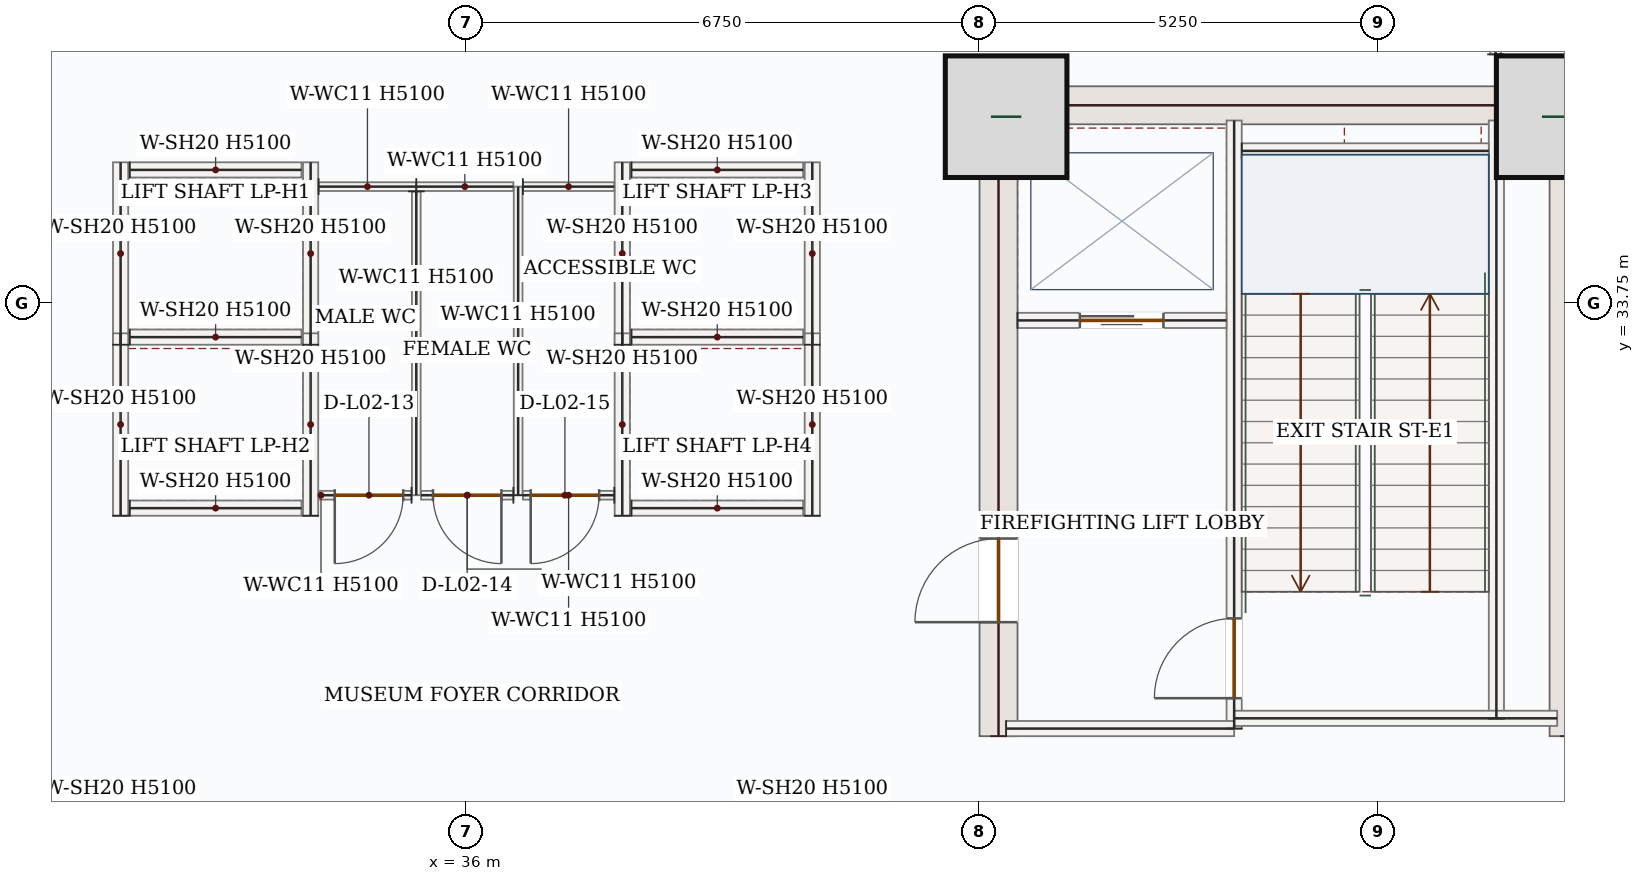
"""IFC4 building model, lengths in metres.
Left out: names, types, materials, properties, quantities, classifications, styles, units other than length and angle.
Written with IfcOpenShell. Run it as: python <this file> out.ifc"""

import sys

from ifc_helpers import new_model, si_unit, direction, frame, frame_2d, origin, origin_2d, place, context, subcontext, project, spatial, rectangle, extrude, source, transform, mapped, element, fill, save


model = new_model("IFC4")
c1 = context("Model", 3, precision=1e-05, world=origin(), true_north=direction((0.0, 1.0)))
c2 = subcontext(c1, "Body", "Model", "MODEL_VIEW")
j1 = project(units=[si_unit("LENGTHUNIT", "METRE"), si_unit("PLANEANGLEUNIT", "RADIAN")], contexts=[c1])
p1 = place(None, origin())
s1 = spatial("IfcSite", under=j1, at=p1, CompositionType="ELEMENT")
p2 = place(p1, origin())
s2 = spatial("IfcBuilding", under=s1, at=p2, CompositionType="ELEMENT")
p3 = place(p2, frame((0.0, 0.0, 12.6)))
s3 = spatial("IfcBuildingStorey", under=s2, at=p3, CompositionType="ELEMENT", Elevation=12.6)
p4 = place(p3, frame((43.0, 28.05, 0.0), z_axis=(0.0, 0.0, 1.0), x_axis=(0.0, 1.0, 0.0)))
e1 = element("IfcWall", 1, at=p4, inside=s3, PredefinedType="SHEAR", context=c2, shape_type="SweptSolid", body=[
    extrude(rectangle(XDim=8.55, YDim=0.5, at=frame_2d((4.275, 0.0))), origin(), (0.0, 0.0, 1.0), 5.1),
])
p5 = place(p4, frame((1.5, 0.0, 0.0)))
e2 = element("IfcOpeningElement", 2, at=p5, cuts=e1, PredefinedType="OPENING", context=c2, shape_type="SweptSolid", body=[
    extrude(rectangle(XDim=1.1, YDim=2.2, at=frame_2d((0.55, 1.1))), frame((0.0, 0.26, 0.0), z_axis=(0.0, -1.0, 0.0), x_axis=(1.0, 0.0, 0.0)), (0.0, 0.0, 1.0), 0.52),
])
m1 = source(origin(), c2, "Body", "SweptSolid", [
    extrude(rectangle(XDim=8.55, YDim=0.5, at=frame_2d((4.275, 0.0))), origin(), (0.0, 0.0, 1.0), 5.1),
])
p6 = place(p3, frame((50.5, 28.05, 0.0), z_axis=(0.0, 0.0, 1.0), x_axis=(0.0, 1.0, 0.0)))
e3 = element("IfcWall", 3, at=p6, inside=s3, PredefinedType="SHEAR", context=c2, shape_type="MappedRepresentation", body=[
    mapped(m1, transform((0.0, 0.0, 0.0), x_axis=(1.0, 0.0, 0.0), y_axis=(0.0, 1.0, 0.0), z_axis=(0.0, 0.0, 1.0), scale=1.0)),
])
m2 = source(origin(), c2, "Body", "SweptSolid", [
    extrude(rectangle(XDim=7.0, YDim=0.5, at=frame_2d((3.5, 0.0))), origin(), (0.0, 0.0, 1.0), 5.1),
])
p7 = place(p3, frame((43.25, 36.35, 0.0), z_axis=(0.0, 0.0, 1.0), x_axis=(1.0, 0.0, 0.0)))
e4 = element("IfcWall", 4, at=p7, inside=s3, PredefinedType="SHEAR", context=c2, shape_type="MappedRepresentation", body=[
    mapped(m2, transform((0.0, 0.0, 0.0), x_axis=(1.0, 0.0, 0.0), y_axis=(0.0, 1.0, 0.0), z_axis=(0.0, 0.0, 1.0), scale=1.0)),
])
m3 = source(origin(), c2, "Body", "SweptSolid", [
    extrude(rectangle(XDim=1.6, YDim=1.6, at=origin_2d()), origin(), (0.0, 0.0, 1.0), 5.4),
])
for number, where, z_axis, x_axis in (
    (5, (43.1, 36.2, 0.0), (0.0, 0.0, 1.0), (1.0, 0.0, 0.0)),
    (6, (50.35, 36.2, 0.0), (0.0, 0.0, 1.0), (1.0, 0.0, 0.0)),
):
    element("IfcColumn", number, at=place(p3, frame(where, z_axis=z_axis, x_axis=x_axis)), inside=s3, PredefinedType="COLUMN", context=c2, shape_type="MappedRepresentation", body=[
        mapped(m3, transform((0.0, 0.0, 0.0), x_axis=(1.0, 0.0, 0.0), y_axis=(0.0, 1.0, 0.0), z_axis=(0.0, 0.0, 1.0), scale=1.0)),
    ])
m4 = source(origin(), c2, "Body", "SweptSolid", [
    extrude(rectangle(XDim=7.87, YDim=0.2, at=frame_2d((3.935, 0.0))), origin(), (0.0, 0.0, 1.0), 5.1),
])
p8 = place(p3, frame((49.55, 28.28, 0.0), z_axis=(0.0, 0.0, 1.0), x_axis=(0.0, 1.0, 0.0)))
e7 = element("IfcWall", 7, at=p8, inside=s3, PredefinedType="SOLIDWALL", context=c2, shape_type="MappedRepresentation", body=[
    mapped(m4, transform((0.0, 0.0, 0.0), x_axis=(1.0, 0.0, 0.0), y_axis=(0.0, 1.0, 0.0), z_axis=(0.0, 0.0, 1.0), scale=1.0)),
])
p9 = place(p3, frame((46.1, 28.15, 0.0), z_axis=(0.0, 0.0, 1.0), x_axis=(0.0, 1.0, 0.0)))
e8 = element("IfcWall", 8, at=p9, inside=s3, PredefinedType="SOLIDWALL", context=c2, shape_type="SweptSolid", body=[
    extrude(rectangle(XDim=8.0, YDim=0.2, at=frame_2d((4.0, 0.0))), origin(), (0.0, 0.0, 1.0), 5.1),
])
p10 = place(p9, frame((0.4, 0.0, 0.0)))
e9 = element("IfcOpeningElement", 9, at=p10, cuts=e8, PredefinedType="OPENING", context=c2, shape_type="SweptSolid", body=[
    extrude(rectangle(XDim=1.05, YDim=2.15, at=frame_2d((0.525, 1.075))), frame((0.0, 0.11, 0.0), z_axis=(0.0, -1.0, 0.0), x_axis=(1.0, 0.0, 0.0)), (0.0, 0.0, 1.0), 0.22),
])
m5 = source(origin(), c2, "Body", "SweptSolid", [
    extrude(rectangle(XDim=3.0, YDim=0.2, at=frame_2d((1.5, 0.0))), origin(), (0.0, 0.0, 1.0), 5.1),
])
p11 = place(p3, frame((43.1, 28.15, 0.0), z_axis=(0.0, 0.0, 1.0), x_axis=(1.0, 0.0, 0.0)))
e10 = element("IfcWall", 10, at=p11, inside=s3, PredefinedType="SOLIDWALL", context=c2, shape_type="MappedRepresentation", body=[
    mapped(m5, transform((0.0, 0.0, 0.0), x_axis=(1.0, 0.0, 0.0), y_axis=(0.0, 1.0, 0.0), z_axis=(0.0, 0.0, 1.0), scale=1.0)),
])
m6 = source(origin(), c2, "Body", "SweptSolid", [
    extrude(rectangle(XDim=4.25, YDim=0.2, at=frame_2d((2.125, 0.0))), origin(), (0.0, 0.0, 1.0), 5.1),
])
p12 = place(p3, frame((46.1, 28.285, 0.0), z_axis=(0.0, 0.0, 1.0), x_axis=(1.0, 0.0, 0.0)))
e11 = element("IfcWall", 11, at=p12, inside=s3, PredefinedType="SOLIDWALL", context=c2, shape_type="MappedRepresentation", body=[
    mapped(m6, transform((0.0, 0.0, 0.0), x_axis=(1.0, 0.0, 0.0), y_axis=(0.0, 1.0, 0.0), z_axis=(0.0, 0.0, 1.0), scale=1.0)),
])
m7 = source(origin(), c2, "Body", "SweptSolid", [
    extrude(rectangle(XDim=3.25, YDim=0.2, at=frame_2d((1.625, 0.0))), origin(), (0.0, 0.0, 1.0), 5.1),
])
p13 = place(p3, frame((46.2, 35.75, 0.0), z_axis=(0.0, 0.0, 1.0), x_axis=(1.0, 0.0, 0.0)))
e12 = element("IfcWall", 12, at=p13, inside=s3, PredefinedType="SOLIDWALL", context=c2, shape_type="MappedRepresentation", body=[
    mapped(m7, transform((0.0, 0.0, 0.0), x_axis=(1.0, 0.0, 0.0), y_axis=(0.0, 1.0, 0.0), z_axis=(0.0, 0.0, 1.0), scale=1.0)),
])
p14 = place(p3, frame((43.25, 33.52, 0.0), z_axis=(0.0, 0.0, 1.0), x_axis=(1.0, 0.0, 0.0)))
e13 = element("IfcWall", 13, at=p14, inside=s3, PredefinedType="SOLIDWALL", context=c2, shape_type="SweptSolid", body=[
    extrude(rectangle(XDim=2.75, YDim=0.2, at=frame_2d((1.375, 0.0))), origin(), (0.0, 0.0, 1.0), 5.1),
])
p15 = place(p14, frame((0.82, 0.0, 0.0)))
e14 = element("IfcOpeningElement", 14, at=p15, cuts=e13, PredefinedType="OPENING", context=c2, shape_type="SweptSolid", body=[
    extrude(rectangle(XDim=1.1, YDim=2.15, at=frame_2d((0.55, 1.075))), frame((0.0, 0.11, 0.0), z_axis=(0.0, -1.0, 0.0), x_axis=(1.0, 0.0, 0.0)), (0.0, 0.0, 1.0), 0.22),
])
m8 = source(origin(), c2, "Body", "SweptSolid", [
    extrude(rectangle(XDim=2.4, YDim=0.2, at=frame_2d((1.2, 0.0))), origin(), (0.0, 0.0, 1.0), 5.1),
])
for number, where, z_axis, x_axis in (
    (15, (31.45, 33.2, 0.0), (0.0, 0.0, 1.0), (0.0, 1.0, 0.0)),
    (16, (33.95, 33.2, 0.0), (0.0, 0.0, 1.0), (0.0, 1.0, 0.0)),
):
    element("IfcWall", number, at=place(p3, frame(where, z_axis=z_axis, x_axis=x_axis)), inside=s3, PredefinedType="SOLIDWALL", context=c2, shape_type="MappedRepresentation", body=[
        mapped(m8, transform((0.0, 0.0, 0.0), x_axis=(1.0, 0.0, 0.0), y_axis=(0.0, 1.0, 0.0), z_axis=(0.0, 0.0, 1.0), scale=1.0)),
    ])
m9 = source(origin(), c2, "Body", "SweptSolid", [
    extrude(rectangle(XDim=2.26, YDim=0.2, at=frame_2d((1.13, 0.0))), origin(), (0.0, 0.0, 1.0), 5.1),
])
for number, where, z_axis, x_axis in (
    (17, (31.57, 33.3, 0.0), (0.0, 0.0, 1.0), (1.0, 0.0, 0.0)),
    (18, (31.57, 35.5, 0.0), (0.0, 0.0, 1.0), (1.0, 0.0, 0.0)),
):
    element("IfcWall", number, at=place(p3, frame(where, z_axis=z_axis, x_axis=x_axis)), inside=s3, PredefinedType="SOLIDWALL", context=c2, shape_type="MappedRepresentation", body=[
        mapped(m9, transform((0.0, 0.0, 0.0), x_axis=(1.0, 0.0, 0.0), y_axis=(0.0, 1.0, 0.0), z_axis=(0.0, 0.0, 1.0), scale=1.0)),
    ])
for number, where, z_axis, x_axis in (
    (19, (31.45, 30.95, 0.0), (0.0, 0.0, 1.0), (0.0, 1.0, 0.0)),
    (20, (33.95, 30.95, 0.0), (0.0, 0.0, 1.0), (0.0, 1.0, 0.0)),
):
    element("IfcWall", number, at=place(p3, frame(where, z_axis=z_axis, x_axis=x_axis)), inside=s3, PredefinedType="SOLIDWALL", context=c2, shape_type="MappedRepresentation", body=[
        mapped(m8, transform((0.0, 0.0, 0.0), x_axis=(1.0, 0.0, 0.0), y_axis=(0.0, 1.0, 0.0), z_axis=(0.0, 0.0, 1.0), scale=1.0)),
    ])
p16 = place(p3, frame((31.57, 31.05, 0.0), z_axis=(0.0, 0.0, 1.0), x_axis=(1.0, 0.0, 0.0)))
e21 = element("IfcWall", 21, at=p16, inside=s3, PredefinedType="SOLIDWALL", context=c2, shape_type="MappedRepresentation", body=[
    mapped(m9, transform((0.0, 0.0, 0.0), x_axis=(1.0, 0.0, 0.0), y_axis=(0.0, 1.0, 0.0), z_axis=(0.0, 0.0, 1.0), scale=1.0)),
])
for number, where, z_axis, x_axis in (
    (22, (38.05, 33.2, 0.0), (0.0, 0.0, 1.0), (0.0, 1.0, 0.0)),
    (23, (40.55, 33.2, 0.0), (0.0, 0.0, 1.0), (0.0, 1.0, 0.0)),
):
    element("IfcWall", number, at=place(p3, frame(where, z_axis=z_axis, x_axis=x_axis)), inside=s3, PredefinedType="SOLIDWALL", context=c2, shape_type="MappedRepresentation", body=[
        mapped(m8, transform((0.0, 0.0, 0.0), x_axis=(1.0, 0.0, 0.0), y_axis=(0.0, 1.0, 0.0), z_axis=(0.0, 0.0, 1.0), scale=1.0)),
    ])
for number, where, z_axis, x_axis in (
    (24, (38.17, 33.3, 0.0), (0.0, 0.0, 1.0), (1.0, 0.0, 0.0)),
    (25, (38.17, 35.5, 0.0), (0.0, 0.0, 1.0), (1.0, 0.0, 0.0)),
):
    element("IfcWall", number, at=place(p3, frame(where, z_axis=z_axis, x_axis=x_axis)), inside=s3, PredefinedType="SOLIDWALL", context=c2, shape_type="MappedRepresentation", body=[
        mapped(m9, transform((0.0, 0.0, 0.0), x_axis=(1.0, 0.0, 0.0), y_axis=(0.0, 1.0, 0.0), z_axis=(0.0, 0.0, 1.0), scale=1.0)),
    ])
for number, where, z_axis, x_axis in (
    (26, (38.05, 30.95, 0.0), (0.0, 0.0, 1.0), (0.0, 1.0, 0.0)),
    (27, (40.55, 30.95, 0.0), (0.0, 0.0, 1.0), (0.0, 1.0, 0.0)),
):
    element("IfcWall", number, at=place(p3, frame(where, z_axis=z_axis, x_axis=x_axis)), inside=s3, PredefinedType="SOLIDWALL", context=c2, shape_type="MappedRepresentation", body=[
        mapped(m8, transform((0.0, 0.0, 0.0), x_axis=(1.0, 0.0, 0.0), y_axis=(0.0, 1.0, 0.0), z_axis=(0.0, 0.0, 1.0), scale=1.0)),
    ])
p17 = place(p3, frame((38.17, 31.05, 0.0), z_axis=(0.0, 0.0, 1.0), x_axis=(1.0, 0.0, 0.0)))
e28 = element("IfcWall", 28, at=p17, inside=s3, PredefinedType="SOLIDWALL", context=c2, shape_type="MappedRepresentation", body=[
    mapped(m9, transform((0.0, 0.0, 0.0), x_axis=(1.0, 0.0, 0.0), y_axis=(0.0, 1.0, 0.0), z_axis=(0.0, 0.0, 1.0), scale=1.0)),
])
m10 = source(origin(), c2, "Body", "SweptSolid", [
    extrude(rectangle(XDim=4.06, YDim=0.115, at=frame_2d((2.03, 0.0))), origin(), (0.0, 0.0, 1.0), 5.1),
])
p18 = place(p3, frame((36.68, 31.22, 0.0), z_axis=(0.0, 0.0, 1.0), x_axis=(0.0, 1.0, 0.0)))
e29 = element("IfcWall", 29, at=p18, inside=s3, PredefinedType="PARTITIONING", context=c2, shape_type="MappedRepresentation", body=[
    mapped(m10, transform((0.0, 0.0, 0.0), x_axis=(1.0, 0.0, 0.0), y_axis=(0.0, 1.0, 0.0), z_axis=(0.0, 0.0, 1.0), scale=1.0)),
])
m11 = source(origin(), c2, "Body", "SweptSolid", [
    extrude(rectangle(XDim=1.203, YDim=0.115, at=frame_2d((0.601, 0.0))), origin(), (0.0, 0.0, 1.0), 5.1),
])
p19 = place(p3, frame((36.742, 35.28, 0.0), z_axis=(0.0, 0.0, 1.0), x_axis=(1.0, 0.0, 0.0)))
e30 = element("IfcWall", 30, at=p19, inside=s3, PredefinedType="PARTITIONING", context=c2, shape_type="MappedRepresentation", body=[
    mapped(m11, transform((0.0, 0.0, 0.0), x_axis=(1.0, 0.0, 0.0), y_axis=(0.0, 1.0, 0.0), z_axis=(0.0, 0.0, 1.0), scale=1.0)),
])
p20 = place(p3, frame((37.945, 31.22, 0.0), z_axis=(0.0, 0.0, 1.0), x_axis=(-1.0, 0.0, 0.0)))
e31 = element("IfcWall", 31, at=p20, inside=s3, PredefinedType="PARTITIONING", context=c2, shape_type="SweptSolid", body=[
    extrude(rectangle(XDim=1.203, YDim=0.115, at=frame_2d((0.601, 0.0))), origin(), (0.0, 0.0, 1.0), 5.1),
])
p21 = place(p20, frame((0.2, 0.0, 0.0)))
e32 = element("IfcOpeningElement", 32, at=p21, cuts=e31, PredefinedType="OPENING", context=c2, shape_type="SweptSolid", body=[
    extrude(rectangle(XDim=0.9, YDim=2.1, at=frame_2d((0.45, 1.05))), frame((0.0, 0.067, 0.0), z_axis=(0.0, -1.0, 0.0), x_axis=(1.0, 0.0, 0.0)), (0.0, 0.0, 1.0), 0.135),
])
m12 = source(origin(), c2, "Body", "SweptSolid", [
    extrude(rectangle(XDim=1.285, YDim=0.115, at=frame_2d((0.643, 0.0))), origin(), (0.0, 0.0, 1.0), 5.1),
])
p22 = place(p3, frame((34.055, 35.28, 0.0), z_axis=(0.0, 0.0, 1.0), x_axis=(1.0, 0.0, 0.0)))
e33 = element("IfcWall", 33, at=p22, inside=s3, PredefinedType="PARTITIONING", context=c2, shape_type="MappedRepresentation", body=[
    mapped(m12, transform((0.0, 0.0, 0.0), x_axis=(1.0, 0.0, 0.0), y_axis=(0.0, 1.0, 0.0), z_axis=(0.0, 0.0, 1.0), scale=1.0)),
])
m13 = source(origin(), c2, "Body", "SweptSolid", [
    extrude(rectangle(XDim=3.998, YDim=0.115, at=frame_2d((1.999, 0.0))), origin(), (0.0, 0.0, 1.0), 5.1),
])
p23 = place(p3, frame((35.34, 35.218, 0.0), z_axis=(0.0, 0.0, 1.0), x_axis=(0.0, -1.0, 0.0)))
e34 = element("IfcWall", 34, at=p23, inside=s3, PredefinedType="PARTITIONING", context=c2, shape_type="MappedRepresentation", body=[
    mapped(m13, transform((0.0, 0.0, 0.0), x_axis=(1.0, 0.0, 0.0), y_axis=(0.0, 1.0, 0.0), z_axis=(0.0, 0.0, 1.0), scale=1.0)),
])
p24 = place(p3, frame((35.278, 31.22, 0.0), z_axis=(0.0, 0.0, 1.0), x_axis=(-1.0, 0.0, 0.0)))
e35 = element("IfcWall", 35, at=p24, inside=s3, PredefinedType="PARTITIONING", context=c2, shape_type="SweptSolid", body=[
    extrude(rectangle(XDim=1.223, YDim=0.115, at=frame_2d((0.611, 0.0))), origin(), (0.0, 0.0, 1.0), 5.1),
])
p25 = place(p24, frame((0.11, 0.0, 0.0)))
e36 = element("IfcOpeningElement", 36, at=p25, cuts=e35, PredefinedType="OPENING", context=c2, shape_type="SweptSolid", body=[
    extrude(rectangle(XDim=0.9, YDim=2.1, at=frame_2d((0.45, 1.05))), frame((0.0, 0.067, 0.0), z_axis=(0.0, -1.0, 0.0), x_axis=(1.0, 0.0, 0.0)), (0.0, 0.0, 1.0), 0.135),
])
m14 = source(origin(), c2, "Body", "SweptSolid", [
    extrude(rectangle(XDim=1.277, YDim=0.115, at=frame_2d((0.639, 0.0))), origin(), (0.0, 0.0, 1.0), 5.1),
])
p26 = place(p3, frame((35.34, 35.28, 0.0), z_axis=(0.0, 0.0, 1.0), x_axis=(1.0, 0.0, 0.0)))
e37 = element("IfcWall", 37, at=p26, inside=s3, PredefinedType="PARTITIONING", context=c2, shape_type="MappedRepresentation", body=[
    mapped(m14, transform((0.0, 0.0, 0.0), x_axis=(1.0, 0.0, 0.0), y_axis=(0.0, 1.0, 0.0), z_axis=(0.0, 0.0, 1.0), scale=1.0)),
])
p27 = place(p3, frame((36.617, 31.22, 0.0), z_axis=(0.0, 0.0, 1.0), x_axis=(-1.0, 0.0, 0.0)))
e38 = element("IfcWall", 38, at=p27, inside=s3, PredefinedType="PARTITIONING", context=c2, shape_type="SweptSolid", body=[
    extrude(rectangle(XDim=1.215, YDim=0.115, at=frame_2d((0.607, 0.0))), origin(), (0.0, 0.0, 1.0), 5.1),
])
p28 = place(p27, frame((0.157, 0.0, 0.0)))
e39 = element("IfcOpeningElement", 39, at=p28, cuts=e38, PredefinedType="OPENING", context=c2, shape_type="SweptSolid", body=[
    extrude(rectangle(XDim=0.9, YDim=2.1, at=frame_2d((0.45, 1.05))), frame((0.0, 0.067, 0.0), z_axis=(0.0, -1.0, 0.0), x_axis=(1.0, 0.0, 0.0)), (0.0, 0.0, 1.0), 0.135),
])
m15 = source(origin(), c2, "Body", "SweptSolid", [
    extrude(rectangle(XDim=1.832, YDim=0.14, at=frame_2d((0.916, 0.0))), origin(), (0.0, 0.0, 1.0), 5.1),
])
p29 = place(p3, frame((49.54, 37.02, 0.0), z_axis=(0.0, 0.0, 1.0), x_axis=(-0.000133244502, 0.999999991123, 0.0)))
e40 = element("IfcWall", 40, at=p29, inside=s3, PredefinedType="PARTITIONING", context=c2, shape_type="MappedRepresentation", body=[
    mapped(m15, transform((0.0, 0.0, 0.0), x_axis=(1.0, 0.0, 0.0), y_axis=(0.0, 1.0, 0.0), z_axis=(0.0, 0.0, 1.0), scale=1.0)),
])
m16 = source(origin(), c2, "Body", "SweptSolid", [
    extrude(rectangle(XDim=1.05, YDim=2.15, at=frame_2d((0.525, 1.075))), frame((0.0, 0.025, 0.0), z_axis=(0.0, -1.0, 0.0), x_axis=(1.0, 0.0, 0.0)), (0.0, 0.0, 1.0), 0.05),
])
p30 = place(p10, origin())
e41 = element("IfcDoor", 41, at=p30, inside=s3, OperationType="SINGLE_SWING_LEFT", PredefinedType="DOOR", context=c2, shape_type="MappedRepresentation", body=[
    mapped(m16, transform((0.0, 0.0, 0.0), x_axis=(1.0, 0.0, 0.0), y_axis=(0.0, 1.0, 0.0), z_axis=(0.0, 0.0, 1.0), scale=1.0)),
])
fill(e9, e41)
m17 = source(origin(), c2, "Body", "SweptSolid", [
    extrude(rectangle(XDim=1.1, YDim=2.15, at=frame_2d((0.55, 1.075))), frame((0.0, 0.025, 0.0), z_axis=(0.0, -1.0, 0.0), x_axis=(1.0, 0.0, 0.0)), (0.0, 0.0, 1.0), 0.05),
])
p31 = place(p15, origin())
e42 = element("IfcDoor", 42, at=p31, inside=s3, OperationType="DOUBLE_DOOR_SLIDING", PredefinedType="DOOR", context=c2, shape_type="MappedRepresentation", body=[
    mapped(m17, transform((0.0, 0.0, 0.0), x_axis=(1.0, 0.0, 0.0), y_axis=(0.0, 1.0, 0.0), z_axis=(0.0, 0.0, 1.0), scale=1.0)),
])
fill(e14, e42)
m18 = source(origin(), c2, "Body", "SweptSolid", [
    extrude(rectangle(XDim=1.1, YDim=2.2, at=frame_2d((0.55, 1.1))), frame((0.0, 0.025, 0.0), z_axis=(0.0, -1.0, 0.0), x_axis=(1.0, 0.0, 0.0)), (0.0, 0.0, 1.0), 0.05),
])
p32 = place(p5, origin())
e43 = element("IfcDoor", 43, at=p32, inside=s3, OperationType="SINGLE_SWING_LEFT", PredefinedType="DOOR", context=c2, shape_type="MappedRepresentation", body=[
    mapped(m18, transform((0.0, 0.0, 0.0), x_axis=(1.0, 0.0, 0.0), y_axis=(0.0, 1.0, 0.0), z_axis=(0.0, 0.0, 1.0), scale=1.0)),
])
fill(e2, e43)
m19 = source(origin(), c2, "Body", "SweptSolid", [
    extrude(rectangle(XDim=0.9, YDim=2.1, at=frame_2d((0.45, 1.05))), frame((0.0, 0.025, 0.0), z_axis=(0.0, -1.0, 0.0), x_axis=(1.0, 0.0, 0.0)), (0.0, 0.0, 1.0), 0.05),
])
p33 = place(p25, origin())
e44 = element("IfcDoor", 44, at=p33, inside=s3, OperationType="SINGLE_SWING_RIGHT", PredefinedType="DOOR", context=c2, shape_type="MappedRepresentation", body=[
    mapped(m19, transform((0.0, 0.0, 0.0), x_axis=(1.0, 0.0, 0.0), y_axis=(0.0, 1.0, 0.0), z_axis=(0.0, 0.0, 1.0), scale=1.0)),
])
fill(e36, e44)
p34 = place(p28, origin())
e45 = element("IfcDoor", 45, at=p34, inside=s3, OperationType="SINGLE_SWING_LEFT", PredefinedType="DOOR", context=c2, shape_type="MappedRepresentation", body=[
    mapped(m19, transform((0.0, 0.0, 0.0), x_axis=(1.0, 0.0, 0.0), y_axis=(0.0, 1.0, 0.0), z_axis=(0.0, 0.0, 1.0), scale=1.0)),
])
fill(e39, e45)
p35 = place(p21, origin())
e46 = element("IfcDoor", 46, at=p35, inside=s3, OperationType="SINGLE_SWING_RIGHT", PredefinedType="DOOR", context=c2, shape_type="MappedRepresentation", body=[
    mapped(m19, transform((0.0, 0.0, 0.0), x_axis=(1.0, 0.0, 0.0), y_axis=(0.0, 1.0, 0.0), z_axis=(0.0, 0.0, 1.0), scale=1.0)),
])
fill(e32, e46)
save(model, sys.argv[1])
